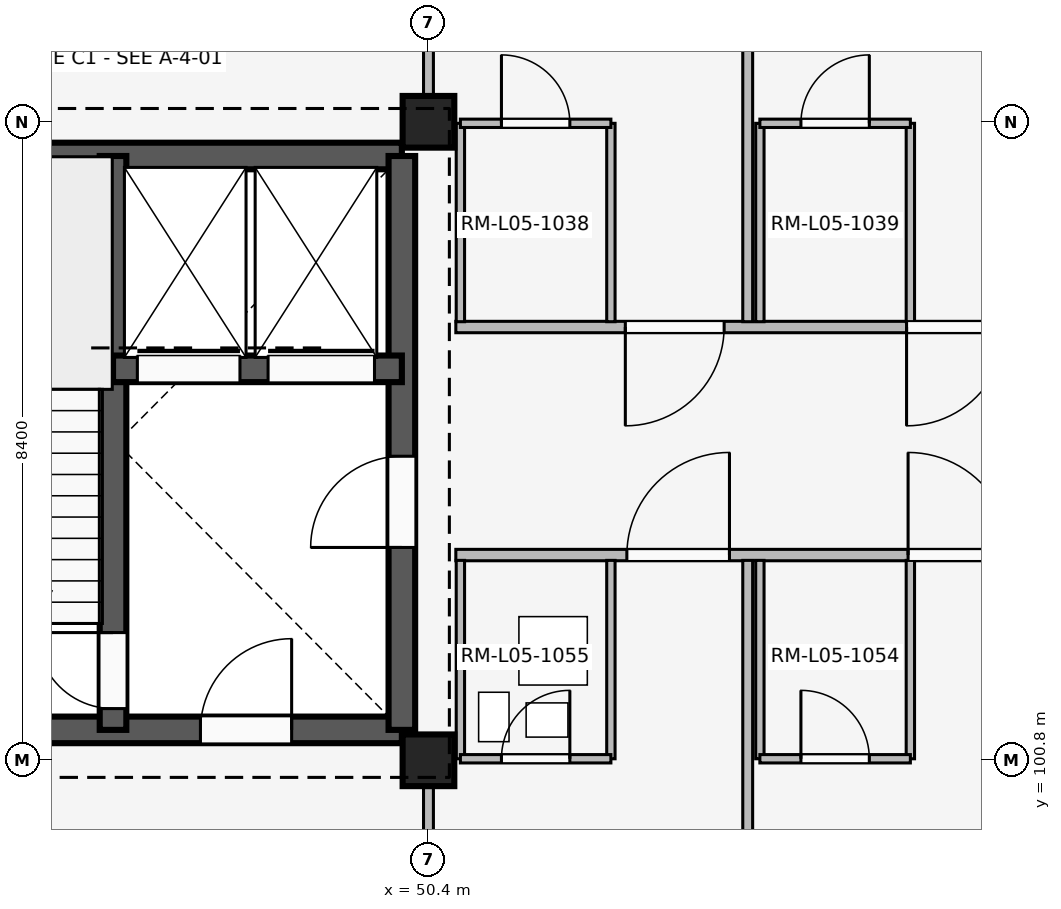
"""IFC4 building model, lengths in metres.
Left out: names, types, materials, properties, quantities, classifications, styles, units other than length and angle.
Written with IfcOpenShell. Run it as: python <this file> out.ifc"""

import sys

from ifc_helpers import new_model, si_unit, direction, frame, frame_2d, origin, origin_2d, place, context, subcontext, project, spatial, rectangle, extrude, element, fill, save


model = new_model("IFC4")
c1 = context("Model", 3, precision=1e-05, world=origin(), true_north=direction((0.0, 1.0)))
c2 = subcontext(c1, "Body", "Model", "MODEL_VIEW")
j1 = project(units=[si_unit("LENGTHUNIT", "METRE"), si_unit("PLANEANGLEUNIT", "RADIAN")], contexts=[c1])
p1 = place(None, origin())
s1 = spatial("IfcSite", under=j1, at=p1, CompositionType="ELEMENT")
p2 = place(p1, origin())
s2 = spatial("IfcBuilding", under=s1, at=p2, CompositionType="ELEMENT")
p3 = place(p2, frame((0.0, 0.0, 20.4)))
s3 = spatial("IfcBuildingStorey", under=s2, at=p3, CompositionType="ELEMENT", Elevation=20.4)
for number, where, z_axis, x_axis in (
    (1, (50.4, 100.8, 0.0), (0.0, 0.0, 1.0), (1.0, 0.0, 0.0)),
    (2, (50.4, 109.2, 0.0), (0.0, 0.0, 1.0), (1.0, 0.0, 0.0)),
):
    element("IfcColumn", number, at=place(p3, frame(where, z_axis=z_axis, x_axis=x_axis)), inside=s3, PredefinedType="COLUMN", context=c2, shape_type="SweptSolid", body=[
        extrude(rectangle(XDim=0.68, YDim=0.68, at=origin_2d()), origin(), (0.0, 0.0, 1.0), 4.2),
    ])
p4 = place(p3, frame((42.55, 101.2, 0.0), z_axis=(0.0, 0.0, 1.0), x_axis=(1.0, 0.0, 0.0)))
e3 = element("IfcWall", 3, at=p4, inside=s3, PredefinedType="SHEAR", context=c2, shape_type="SweptSolid", body=[
    extrude(rectangle(XDim=7.5, YDim=0.35, at=frame_2d((3.75, 0.0))), origin(), (0.0, 0.0, 1.0), 3.92),
])
p5 = place(p4, frame((4.85, 0.0, 0.0)))
e4 = element("IfcOpeningElement", 4, at=p5, cuts=e3, PredefinedType="OPENING", context=c2, shape_type="SweptSolid", body=[
    extrude(rectangle(XDim=1.2, YDim=2.2, at=frame_2d((0.6, 1.1))), frame((0.0, 0.185, 0.0), z_axis=(0.0, -1.0, 0.0), x_axis=(1.0, 0.0, 0.0)), (0.0, 0.0, 1.0), 0.37),
])
p6 = place(p3, frame((42.55, 108.75, 0.0), z_axis=(0.0, 0.0, 1.0), x_axis=(1.0, 0.0, 0.0)))
e5 = element("IfcWall", 5, at=p6, inside=s3, PredefinedType="SHEAR", context=c2, shape_type="SweptSolid", body=[
    extrude(rectangle(XDim=7.5, YDim=0.35, at=frame_2d((3.75, 0.0))), origin(), (0.0, 0.0, 1.0), 3.92),
])
p7 = place(p3, frame((50.05, 101.2, 0.0), z_axis=(0.0, 0.0, 1.0), x_axis=(0.0, 1.0, 0.0)))
e6 = element("IfcWall", 6, at=p7, inside=s3, PredefinedType="SHEAR", context=c2, shape_type="SweptSolid", body=[
    extrude(rectangle(XDim=7.55, YDim=0.35, at=frame_2d((3.775, 0.0))), origin(), (0.0, 0.0, 1.0), 3.92),
])
p8 = place(p7, frame((2.4, 0.0, 0.0)))
e7 = element("IfcOpeningElement", 7, at=p8, cuts=e6, PredefinedType="OPENING", context=c2, shape_type="SweptSolid", body=[
    extrude(rectangle(XDim=1.2, YDim=2.2, at=frame_2d((0.6, 1.1))), frame((0.0, 0.185, 0.0), z_axis=(0.0, -1.0, 0.0), x_axis=(1.0, 0.0, 0.0)), (0.0, 0.0, 1.0), 0.37),
])
p9 = place(p3, frame((46.25, 101.2, 0.0), z_axis=(0.0, 0.0, 1.0), x_axis=(0.0, 1.0, 0.0)))
e8 = element("IfcWall", 8, at=p9, inside=s3, PredefinedType="SHEAR", context=c2, shape_type="SweptSolid", body=[
    extrude(rectangle(XDim=7.55, YDim=0.35, at=frame_2d((3.775, 0.0))), origin(), (0.0, 0.0, 1.0), 3.92),
])
p10 = place(p9, frame((0.28, 0.0, 0.0)))
e9 = element("IfcOpeningElement", 9, at=p10, cuts=e8, PredefinedType="OPENING", context=c2, shape_type="SweptSolid", body=[
    extrude(rectangle(XDim=1.0, YDim=2.15, at=frame_2d((0.5, 1.075))), frame((0.0, 0.185, 0.0), z_axis=(0.0, -1.0, 0.0), x_axis=(1.0, 0.0, 0.0)), (0.0, 0.0, 1.0), 0.37),
])
p11 = place(p3, frame((46.25, 105.95, 0.0), z_axis=(0.0, 0.0, 1.0), x_axis=(1.0, 0.0, 0.0)))
e10 = element("IfcWall", 10, at=p11, inside=s3, PredefinedType="SHEAR", context=c2, shape_type="SweptSolid", body=[
    extrude(rectangle(XDim=3.8, YDim=0.35, at=frame_2d((1.9, 0.0))), origin(), (0.0, 0.0, 1.0), 3.92),
])
p12 = place(p11, frame((0.32, 0.0, 0.0)))
e11 = element("IfcOpeningElement", 11, at=p12, cuts=e10, PredefinedType="OPENING", context=c2, shape_type="SweptSolid", body=[
    extrude(rectangle(XDim=1.35, YDim=2.25, at=frame_2d((0.675, 1.125))), frame((0.0, 0.185, 0.0), z_axis=(0.0, -1.0, 0.0), x_axis=(1.0, 0.0, 0.0)), (0.0, 0.0, 1.0), 0.37),
])
p13 = place(p11, frame((2.04, 0.0, 0.0)))
e12 = element("IfcOpeningElement", 12, at=p13, cuts=e10, PredefinedType="OPENING", context=c2, shape_type="SweptSolid", body=[
    extrude(rectangle(XDim=1.4, YDim=2.25, at=frame_2d((0.7, 1.125))), frame((0.0, 0.185, 0.0), z_axis=(0.0, -1.0, 0.0), x_axis=(1.0, 0.0, 0.0)), (0.0, 0.0, 1.0), 0.37),
])
p14 = place(p3, frame((50.4, 92.54, 0.0), z_axis=(0.0, 0.0, 1.0), x_axis=(0.0, 1.0, 0.0)))
e13 = element("IfcWall", 13, at=p14, inside=s3, PredefinedType="PARTITIONING", context=c2, shape_type="SweptSolid", body=[
    extrude(rectangle(XDim=8.21, YDim=0.13, at=frame_2d((4.105, 0.0))), origin(), (0.0, 0.0, 1.0), 3.32),
])
p15 = place(p14, frame((3.64, 0.0, 0.0)))
e14 = element("IfcOpeningElement", 14, at=p15, cuts=e13, PredefinedType="OPENING", context=c2, shape_type="SweptSolid", body=[
    extrude(rectangle(XDim=1.08, YDim=2.15, at=frame_2d((0.54, 1.075))), frame((0.0, 0.075, 0.0), z_axis=(0.0, -1.0, 0.0), x_axis=(1.0, 0.0, 0.0)), (0.0, 0.0, 1.0), 0.15),
])
p16 = place(p3, frame((50.4, 109.55, 0.0), z_axis=(0.0, 0.0, 1.0), x_axis=(0.0, 1.0, 0.0)))
e15 = element("IfcWall", 15, at=p16, inside=s3, PredefinedType="PARTITIONING", context=c2, shape_type="SweptSolid", body=[
    extrude(rectangle(XDim=7.91, YDim=0.13, at=frame_2d((3.955, 0.0))), origin(), (0.0, 0.0, 1.0), 3.32),
])
p17 = place(p16, frame((3.4, 0.0, 0.0)))
e16 = element("IfcOpeningElement", 16, at=p17, cuts=e15, PredefinedType="OPENING", context=c2, shape_type="SweptSolid", body=[
    extrude(rectangle(XDim=1.05, YDim=2.2, at=frame_2d((0.525, 1.1))), frame((0.0, 0.075, 0.0), z_axis=(0.0, -1.0, 0.0), x_axis=(1.0, 0.0, 0.0)), (0.0, 0.0, 1.0), 0.15),
])
p18 = place(p3, frame((50.76, 103.5, 0.0), z_axis=(0.0, 0.0, 1.0), x_axis=(1.0, 0.0, 0.0)))
e17 = element("IfcWall", 17, at=p18, inside=s3, PredefinedType="PARTITIONING", context=c2, shape_type="SweptSolid", body=[
    extrude(rectangle(XDim=7.96, YDim=0.15, at=frame_2d((3.98, 0.0))), origin(), (0.0, 0.0, 1.0), 3.32),
])
p19 = place(p18, frame((2.25, 0.0, 0.0)))
e18 = element("IfcOpeningElement", 18, at=p19, cuts=e17, PredefinedType="OPENING", context=c2, shape_type="SweptSolid", body=[
    extrude(rectangle(XDim=1.35, YDim=2.25, at=frame_2d((0.675, 1.125))), frame((0.0, 0.085, 0.0), z_axis=(0.0, -1.0, 0.0), x_axis=(1.0, 0.0, 0.0)), (0.0, 0.0, 1.0), 0.17),
])
p20 = place(p18, frame((5.95, 0.0, 0.0)))
e19 = element("IfcOpeningElement", 19, at=p20, cuts=e17, PredefinedType="OPENING", context=c2, shape_type="SweptSolid", body=[
    extrude(rectangle(XDim=1.35, YDim=2.25, at=frame_2d((0.675, 1.125))), frame((0.0, 0.085, 0.0), z_axis=(0.0, -1.0, 0.0), x_axis=(1.0, 0.0, 0.0)), (0.0, 0.0, 1.0), 0.17),
])
p21 = place(p3, frame((54.6, 92.5, 0.0), z_axis=(0.0, 0.0, 1.0), x_axis=(0.0, 1.0, 0.0)))
e20 = element("IfcWall", 20, at=p21, inside=s3, PredefinedType="PARTITIONING", context=c2, shape_type="SweptSolid", body=[
    extrude(rectangle(XDim=10.93, YDim=0.13, at=frame_2d((5.465, 0.0))), origin(), (0.0, 0.0, 1.0), 3.32),
])
for number, where, z_axis, x_axis in (
    (21, (50.82, 100.82, 0.0), (0.0, 0.0, 1.0), (0.0, 1.0, 0.0)),
    (22, (52.8, 100.82, 0.0), (0.0, 0.0, 1.0), (0.0, 1.0, 0.0)),
):
    element("IfcWall", number, at=place(p3, frame(where, z_axis=z_axis, x_axis=x_axis)), inside=s3, PredefinedType="PARTITIONING", context=c2, shape_type="SweptSolid", body=[
        extrude(rectangle(XDim=2.61, YDim=0.11, at=frame_2d((1.305, 0.0))), origin(), (0.0, 0.0, 1.0), 3.32),
    ])
p22 = place(p3, frame((50.82, 100.82, 0.0), z_axis=(0.0, 0.0, 1.0), x_axis=(1.0, 0.0, 0.0)))
e23 = element("IfcWall", 23, at=p22, inside=s3, PredefinedType="PARTITIONING", context=c2, shape_type="SweptSolid", body=[
    extrude(rectangle(XDim=1.98, YDim=0.11, at=frame_2d((0.99, 0.0))), origin(), (0.0, 0.0, 1.0), 3.32),
])
p23 = place(p22, frame((0.54, 0.0, 0.0)))
e24 = element("IfcOpeningElement", 24, at=p23, cuts=e23, PredefinedType="OPENING", context=c2, shape_type="SweptSolid", body=[
    extrude(rectangle(XDim=0.9, YDim=2.1, at=frame_2d((0.45, 1.05))), frame((0.0, 0.065, 0.0), z_axis=(0.0, -1.0, 0.0), x_axis=(1.0, 0.0, 0.0)), (0.0, 0.0, 1.0), 0.13),
])
for number, where, z_axis, x_axis in (
    (25, (54.76, 100.82, 0.0), (0.0, 0.0, 1.0), (0.0, 1.0, 0.0)),
    (26, (56.74, 100.82, 0.0), (0.0, 0.0, 1.0), (0.0, 1.0, 0.0)),
):
    element("IfcWall", number, at=place(p3, frame(where, z_axis=z_axis, x_axis=x_axis)), inside=s3, PredefinedType="PARTITIONING", context=c2, shape_type="SweptSolid", body=[
        extrude(rectangle(XDim=2.61, YDim=0.11, at=frame_2d((1.305, 0.0))), origin(), (0.0, 0.0, 1.0), 3.32),
    ])
p24 = place(p3, frame((54.76, 100.82, 0.0), z_axis=(0.0, 0.0, 1.0), x_axis=(1.0, 0.0, 0.0)))
e27 = element("IfcWall", 27, at=p24, inside=s3, PredefinedType="PARTITIONING", context=c2, shape_type="SweptSolid", body=[
    extrude(rectangle(XDim=1.98, YDim=0.11, at=frame_2d((0.99, 0.0))), origin(), (0.0, 0.0, 1.0), 3.32),
])
p25 = place(p24, frame((0.54, 0.0, 0.0)))
e28 = element("IfcOpeningElement", 28, at=p25, cuts=e27, PredefinedType="OPENING", context=c2, shape_type="SweptSolid", body=[
    extrude(rectangle(XDim=0.9, YDim=2.1, at=frame_2d((0.45, 1.05))), frame((0.0, 0.065, 0.0), z_axis=(0.0, -1.0, 0.0), x_axis=(1.0, 0.0, 0.0)), (0.0, 0.0, 1.0), 0.13),
])
p26 = place(p3, frame((58.72, 106.5, 0.0), z_axis=(0.0, 0.0, 1.0), x_axis=(-1.0, 0.0, 0.0)))
e29 = element("IfcWall", 29, at=p26, inside=s3, PredefinedType="PARTITIONING", context=c2, shape_type="SweptSolid", body=[
    extrude(rectangle(XDim=7.96, YDim=0.15, at=frame_2d((3.98, 0.0))), origin(), (0.0, 0.0, 1.0), 3.32),
])
p27 = place(p26, frame((0.73, 0.0, 0.0)))
e30 = element("IfcOpeningElement", 30, at=p27, cuts=e29, PredefinedType="OPENING", context=c2, shape_type="SweptSolid", body=[
    extrude(rectangle(XDim=1.3, YDim=2.25, at=frame_2d((0.65, 1.125))), frame((0.0, 0.085, 0.0), z_axis=(0.0, -1.0, 0.0), x_axis=(1.0, 0.0, 0.0)), (0.0, 0.0, 1.0), 0.17),
])
p28 = place(p26, frame((4.43, 0.0, 0.0)))
e31 = element("IfcOpeningElement", 31, at=p28, cuts=e29, PredefinedType="OPENING", context=c2, shape_type="SweptSolid", body=[
    extrude(rectangle(XDim=1.3, YDim=2.25, at=frame_2d((0.65, 1.125))), frame((0.0, 0.085, 0.0), z_axis=(0.0, -1.0, 0.0), x_axis=(1.0, 0.0, 0.0)), (0.0, 0.0, 1.0), 0.17),
])
p29 = place(p3, frame((54.6, 106.57, 0.0), z_axis=(0.0, 0.0, 1.0), x_axis=(0.0, 1.0, 0.0)))
e32 = element("IfcWall", 32, at=p29, inside=s3, PredefinedType="PARTITIONING", context=c2, shape_type="SweptSolid", body=[
    extrude(rectangle(XDim=10.93, YDim=0.13, at=frame_2d((5.465, 0.0))), origin(), (0.0, 0.0, 1.0), 3.32),
])
for number, where, z_axis, x_axis in (
    (33, (50.82, 106.57, 0.0), (0.0, 0.0, 1.0), (0.0, 1.0, 0.0)),
    (34, (52.8, 106.57, 0.0), (0.0, 0.0, 1.0), (0.0, 1.0, 0.0)),
):
    element("IfcWall", number, at=place(p3, frame(where, z_axis=z_axis, x_axis=x_axis)), inside=s3, PredefinedType="PARTITIONING", context=c2, shape_type="SweptSolid", body=[
        extrude(rectangle(XDim=2.61, YDim=0.11, at=frame_2d((1.305, 0.0))), origin(), (0.0, 0.0, 1.0), 3.32),
    ])
p30 = place(p3, frame((50.82, 109.18, 0.0), z_axis=(0.0, 0.0, 1.0), x_axis=(1.0, 0.0, 0.0)))
e35 = element("IfcWall", 35, at=p30, inside=s3, PredefinedType="PARTITIONING", context=c2, shape_type="SweptSolid", body=[
    extrude(rectangle(XDim=1.98, YDim=0.11, at=frame_2d((0.99, 0.0))), origin(), (0.0, 0.0, 1.0), 3.32),
])
p31 = place(p30, frame((0.54, 0.0, 0.0)))
e36 = element("IfcOpeningElement", 36, at=p31, cuts=e35, PredefinedType="OPENING", context=c2, shape_type="SweptSolid", body=[
    extrude(rectangle(XDim=0.9, YDim=2.1, at=frame_2d((0.45, 1.05))), frame((0.0, 0.065, 0.0), z_axis=(0.0, -1.0, 0.0), x_axis=(1.0, 0.0, 0.0)), (0.0, 0.0, 1.0), 0.13),
])
for number, where, z_axis, x_axis in (
    (37, (54.76, 106.57, 0.0), (0.0, 0.0, 1.0), (0.0, 1.0, 0.0)),
    (38, (56.74, 106.57, 0.0), (0.0, 0.0, 1.0), (0.0, 1.0, 0.0)),
):
    element("IfcWall", number, at=place(p3, frame(where, z_axis=z_axis, x_axis=x_axis)), inside=s3, PredefinedType="PARTITIONING", context=c2, shape_type="SweptSolid", body=[
        extrude(rectangle(XDim=2.61, YDim=0.11, at=frame_2d((1.305, 0.0))), origin(), (0.0, 0.0, 1.0), 3.32),
    ])
p32 = place(p3, frame((54.76, 109.18, 0.0), z_axis=(0.0, 0.0, 1.0), x_axis=(1.0, 0.0, 0.0)))
e39 = element("IfcWall", 39, at=p32, inside=s3, PredefinedType="PARTITIONING", context=c2, shape_type="SweptSolid", body=[
    extrude(rectangle(XDim=1.98, YDim=0.11, at=frame_2d((0.99, 0.0))), origin(), (0.0, 0.0, 1.0), 3.32),
])
p33 = place(p32, frame((0.54, 0.0, 0.0)))
e40 = element("IfcOpeningElement", 40, at=p33, cuts=e39, PredefinedType="OPENING", context=c2, shape_type="SweptSolid", body=[
    extrude(rectangle(XDim=0.9, YDim=2.1, at=frame_2d((0.45, 1.05))), frame((0.0, 0.065, 0.0), z_axis=(0.0, -1.0, 0.0), x_axis=(1.0, 0.0, 0.0)), (0.0, 0.0, 1.0), 0.13),
])
p34 = place(p8, origin())
e41 = element("IfcDoor", 41, at=p34, inside=s3, OperationType="SINGLE_SWING_LEFT", PredefinedType="DOOR", context=c2, shape_type="SweptSolid", body=[
    extrude(rectangle(XDim=1.2, YDim=2.2, at=frame_2d((0.6, 1.1))), frame((0.0, 0.025, 0.0), z_axis=(0.0, -1.0, 0.0), x_axis=(1.0, 0.0, 0.0)), (0.0, 0.0, 1.0), 0.05),
])
fill(e7, e41)
p35 = place(p5, origin())
e42 = element("IfcDoor", 42, at=p35, inside=s3, OperationType="SINGLE_SWING_RIGHT", PredefinedType="DOOR", context=c2, shape_type="SweptSolid", body=[
    extrude(rectangle(XDim=1.2, YDim=2.2, at=frame_2d((0.6, 1.1))), frame((0.0, 0.025, 0.0), z_axis=(0.0, -1.0, 0.0), x_axis=(1.0, 0.0, 0.0)), (0.0, 0.0, 1.0), 0.05),
])
fill(e4, e42)
p36 = place(p10, origin())
e43 = element("IfcDoor", 43, at=p36, inside=s3, OperationType="SINGLE_SWING_RIGHT", PredefinedType="DOOR", context=c2, shape_type="SweptSolid", body=[
    extrude(rectangle(XDim=1.0, YDim=2.15, at=frame_2d((0.5, 1.075))), frame((0.0, 0.025, 0.0), z_axis=(0.0, -1.0, 0.0), x_axis=(1.0, 0.0, 0.0)), (0.0, 0.0, 1.0), 0.05),
])
fill(e9, e43)
p37 = place(p12, origin())
e44 = element("IfcDoor", 44, at=p37, inside=s3, OperationType="SLIDING_TO_LEFT", PredefinedType="DOOR", context=c2, shape_type="SweptSolid", body=[
    extrude(rectangle(XDim=1.35, YDim=2.25, at=frame_2d((0.675, 1.125))), frame((0.0, 0.025, 0.0), z_axis=(0.0, -1.0, 0.0), x_axis=(1.0, 0.0, 0.0)), (0.0, 0.0, 1.0), 0.05),
])
fill(e11, e44)
p38 = place(p13, origin())
e45 = element("IfcDoor", 45, at=p38, inside=s3, OperationType="SLIDING_TO_LEFT", PredefinedType="DOOR", context=c2, shape_type="SweptSolid", body=[
    extrude(rectangle(XDim=1.4, YDim=2.25, at=frame_2d((0.7, 1.125))), frame((0.0, 0.025, 0.0), z_axis=(0.0, -1.0, 0.0), x_axis=(1.0, 0.0, 0.0)), (0.0, 0.0, 1.0), 0.05),
])
fill(e12, e45)
p39 = place(p19, origin())
e46 = element("IfcDoor", 46, at=p39, inside=s3, OperationType="SINGLE_SWING_RIGHT", PredefinedType="DOOR", context=c2, shape_type="SweptSolid", body=[
    extrude(rectangle(XDim=1.35, YDim=2.25, at=frame_2d((0.675, 1.125))), frame((0.0, 0.025, 0.0), z_axis=(0.0, -1.0, 0.0), x_axis=(1.0, 0.0, 0.0)), (0.0, 0.0, 1.0), 0.05),
])
fill(e18, e46)
p40 = place(p20, origin())
e47 = element("IfcDoor", 47, at=p40, inside=s3, OperationType="SINGLE_SWING_LEFT", PredefinedType="DOOR", context=c2, shape_type="SweptSolid", body=[
    extrude(rectangle(XDim=1.35, YDim=2.25, at=frame_2d((0.675, 1.125))), frame((0.0, 0.025, 0.0), z_axis=(0.0, -1.0, 0.0), x_axis=(1.0, 0.0, 0.0)), (0.0, 0.0, 1.0), 0.05),
])
fill(e19, e47)
p41 = place(p23, origin())
e48 = element("IfcDoor", 48, at=p41, inside=s3, OperationType="SINGLE_SWING_RIGHT", PredefinedType="DOOR", context=c2, shape_type="SweptSolid", body=[
    extrude(rectangle(XDim=0.9, YDim=2.1, at=frame_2d((0.45, 1.05))), frame((0.0, 0.025, 0.0), z_axis=(0.0, -1.0, 0.0), x_axis=(1.0, 0.0, 0.0)), (0.0, 0.0, 1.0), 0.05),
])
fill(e24, e48)
p42 = place(p25, origin())
e49 = element("IfcDoor", 49, at=p42, inside=s3, OperationType="SINGLE_SWING_LEFT", PredefinedType="DOOR", context=c2, shape_type="SweptSolid", body=[
    extrude(rectangle(XDim=0.9, YDim=2.1, at=frame_2d((0.45, 1.05))), frame((0.0, 0.025, 0.0), z_axis=(0.0, -1.0, 0.0), x_axis=(1.0, 0.0, 0.0)), (0.0, 0.0, 1.0), 0.05),
])
fill(e28, e49)
p43 = place(p27, origin())
e50 = element("IfcDoor", 50, at=p43, inside=s3, OperationType="SINGLE_SWING_RIGHT", PredefinedType="DOOR", context=c2, shape_type="SweptSolid", body=[
    extrude(rectangle(XDim=1.3, YDim=2.25, at=frame_2d((0.65, 1.125))), frame((0.0, 0.025, 0.0), z_axis=(0.0, -1.0, 0.0), x_axis=(1.0, 0.0, 0.0)), (0.0, 0.0, 1.0), 0.05),
])
fill(e30, e50)
p44 = place(p28, origin())
e51 = element("IfcDoor", 51, at=p44, inside=s3, OperationType="SINGLE_SWING_RIGHT", PredefinedType="DOOR", context=c2, shape_type="SweptSolid", body=[
    extrude(rectangle(XDim=1.3, YDim=2.25, at=frame_2d((0.65, 1.125))), frame((0.0, 0.025, 0.0), z_axis=(0.0, -1.0, 0.0), x_axis=(1.0, 0.0, 0.0)), (0.0, 0.0, 1.0), 0.05),
])
fill(e31, e51)
p45 = place(p31, origin())
e52 = element("IfcDoor", 52, at=p45, inside=s3, OperationType="SINGLE_SWING_LEFT", PredefinedType="DOOR", context=c2, shape_type="SweptSolid", body=[
    extrude(rectangle(XDim=0.9, YDim=2.1, at=frame_2d((0.45, 1.05))), frame((0.0, 0.025, 0.0), z_axis=(0.0, -1.0, 0.0), x_axis=(1.0, 0.0, 0.0)), (0.0, 0.0, 1.0), 0.05),
])
fill(e36, e52)
p46 = place(p33, origin())
e53 = element("IfcDoor", 53, at=p46, inside=s3, OperationType="SINGLE_SWING_RIGHT", PredefinedType="DOOR", context=c2, shape_type="SweptSolid", body=[
    extrude(rectangle(XDim=0.9, YDim=2.1, at=frame_2d((0.45, 1.05))), frame((0.0, 0.025, 0.0), z_axis=(0.0, -1.0, 0.0), x_axis=(1.0, 0.0, 0.0)), (0.0, 0.0, 1.0), 0.05),
])
fill(e40, e53)
save(model, sys.argv[1])
